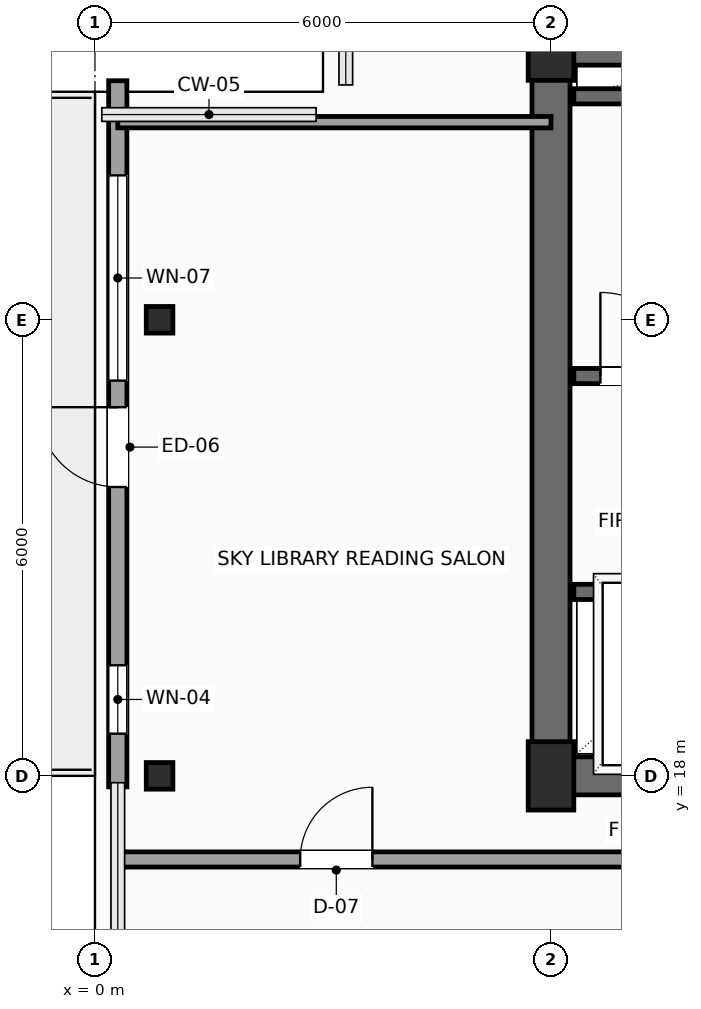
"""IFC4 building model, lengths in metres.
Left out: names, types, materials, properties, quantities, classifications, styles, units other than length and angle.
Written with IfcOpenShell. Run it as: python <this file> out.ifc"""

import sys

from ifc_helpers import new_model, si_unit, direction, frame, frame_2d, origin, origin_2d, place, context, subcontext, project, spatial, rectangle, hollow_rectangle, extrude, element, fill, save


model = new_model("IFC4")
c1 = context("Model", 3, precision=1e-05, world=origin(), true_north=direction((0.0, 1.0)))
c2 = subcontext(c1, "Body", "Model", "MODEL_VIEW")
j1 = project(units=[si_unit("LENGTHUNIT", "METRE"), si_unit("PLANEANGLEUNIT", "RADIAN")], contexts=[c1])
p1 = place(None, origin())
s1 = spatial("IfcSite", under=j1, at=p1, CompositionType="ELEMENT")
p2 = place(p1, origin())
s2 = spatial("IfcBuilding", under=s1, at=p2, CompositionType="ELEMENT")
p3 = place(p2, frame((0.0, 0.0, 274.7)))
s3 = spatial("IfcBuildingStorey", under=s2, at=p3, CompositionType="ELEMENT", Elevation=274.7)
for number, where, z_axis, x_axis in (
    (1, (6.0, 18.0, 0.0), (0.0, 0.0, 1.0), (1.0, 0.0, 0.0)),
    (2, (6.0, 27.6, 0.0), (0.0, 0.0, 1.0), (1.0, 0.0, 0.0)),
):
    element("IfcColumn", number, at=place(p3, frame(where, z_axis=z_axis, x_axis=x_axis)), inside=s3, PredefinedType="COLUMN", context=c2, shape_type="SweptSolid", body=[
        extrude(rectangle(XDim=0.6, YDim=0.9, at=origin_2d()), origin(), (0.0, 0.0, 1.0), 3.5),
    ])
for number, where, z_axis, x_axis in (
    (3, (0.85, 18.0, 0.0), (0.0, 0.0, 1.0), (1.0, 0.0, 0.0)),
    (4, (0.85, 24.0, 0.0), (0.0, 0.0, 1.0), (1.0, 0.0, 0.0)),
):
    element("IfcColumn", number, at=place(p3, frame(where, z_axis=z_axis, x_axis=x_axis)), inside=s3, PredefinedType="COLUMN", context=c2, shape_type="SweptSolid", body=[
        extrude(hollow_rectangle(XDim=0.35, YDim=0.35, WallThickness=0.016, InnerFilletRadius=0.016, OuterFilletRadius=0.032, at=origin_2d()), origin(), (0.0, 0.0, 1.0), 3.5),
    ])
p4 = place(p3, frame((0.3, 17.855, 0.0), z_axis=(0.0, 0.0, 1.0), x_axis=(0.0, 1.0, 0.0)))
e5 = element("IfcWall", 5, at=p4, inside=s3, PredefinedType="SOLIDWALL", context=c2, shape_type="SweptSolid", body=[
    extrude(rectangle(XDim=9.29, YDim=0.24, at=frame_2d((4.645, 0.0))), origin(), (0.0, 0.0, 1.0), 3.3),
])
p5 = place(p4, frame((3.945, 0.0, 0.0)))
e6 = element("IfcOpeningElement", 6, at=p5, cuts=e5, PredefinedType="OPENING", context=c2, shape_type="SweptSolid", body=[
    extrude(rectangle(XDim=1.05, YDim=2.2, at=frame_2d((0.525, 1.1))), frame((0.0, 0.13, 0.0), z_axis=(0.0, -1.0, 0.0), x_axis=(1.0, 0.0, 0.0)), (0.0, 0.0, 1.0), 0.26),
])
p6 = place(p4, frame((5.345, 0.0, 0.6)))
e7 = element("IfcOpeningElement", 7, at=p6, cuts=e5, PredefinedType="OPENING", context=c2, shape_type="SweptSolid", body=[
    extrude(rectangle(XDim=2.7, YDim=2.3, at=frame_2d((1.35, 1.15))), frame((0.0, 0.13, 0.0), z_axis=(0.0, -1.0, 0.0), x_axis=(1.0, 0.0, 0.0)), (0.0, 0.0, 1.0), 0.26),
])
p7 = place(p4, frame((0.7, 0.0, 0.6)))
e8 = element("IfcOpeningElement", 8, at=p7, cuts=e5, PredefinedType="OPENING", context=c2, shape_type="SweptSolid", body=[
    extrude(rectangle(XDim=0.9, YDim=2.2, at=frame_2d((0.45, 1.1))), frame((0.0, 0.13, 0.0), z_axis=(0.0, -1.0, 0.0), x_axis=(1.0, 0.0, 0.0)), (0.0, 0.0, 1.0), 0.26),
])
p8 = place(p3, frame((6.0, 18.0, 0.0), z_axis=(0.0, 0.0, 1.0), x_axis=(1.0, 0.0, 0.0)))
e9 = element("IfcWall", 9, at=p8, inside=s3, PredefinedType="SHEAR", context=c2, shape_type="SweptSolid", body=[
    extrude(rectangle(XDim=12.0, YDim=0.5, at=frame_2d((6.0, 0.0))), origin(), (0.0, 0.0, 1.0), 3.3),
])
p9 = place(p8, frame((7.1, 0.0, 0.0)))
e10 = element("IfcOpeningElement", 10, at=p9, cuts=e9, PredefinedType="OPENING", context=c2, shape_type="SweptSolid", body=[
    extrude(rectangle(XDim=1.6, YDim=2.3, at=frame_2d((0.8, 1.15))), frame((0.0, 0.26, 0.0), z_axis=(0.0, -1.0, 0.0), x_axis=(1.0, 0.0, 0.0)), (0.0, 0.0, 1.0), 0.52),
])
p10 = place(p3, frame((6.0, 27.6, 0.0), z_axis=(0.0, 0.0, 1.0), x_axis=(1.0, 0.0, 0.0)))
e11 = element("IfcWall", 11, at=p10, inside=s3, PredefinedType="SHEAR", context=c2, shape_type="SweptSolid", body=[
    extrude(rectangle(XDim=12.0, YDim=0.5, at=frame_2d((6.0, 0.0))), origin(), (0.0, 0.0, 1.0), 3.3),
])
p11 = place(p10, frame((10.3, 0.0, 0.0)))
e12 = element("IfcOpeningElement", 12, at=p11, cuts=e11, PredefinedType="OPENING", context=c2, shape_type="SweptSolid", body=[
    extrude(rectangle(XDim=0.9, YDim=2.15, at=frame_2d((0.45, 1.075))), frame((0.0, 0.26, 0.0), z_axis=(0.0, -1.0, 0.0), x_axis=(1.0, 0.0, 0.0)), (0.0, 0.0, 1.0), 0.52),
])
p12 = place(p3, frame((6.0, 18.0, 0.0), z_axis=(0.0, 0.0, 1.0), x_axis=(0.0, 1.0, 0.0)))
e13 = element("IfcWall", 13, at=p12, inside=s3, PredefinedType="SHEAR", context=c2, shape_type="SweptSolid", body=[
    extrude(rectangle(XDim=9.6, YDim=0.5, at=frame_2d((4.8, 0.0))), origin(), (0.0, 0.0, 1.0), 3.3),
])
p13 = place(p3, frame((6.3, 23.26, 0.0), z_axis=(0.0, 0.0, 1.0), x_axis=(1.0, 0.0, 0.0)))
e14 = element("IfcWall", 14, at=p13, inside=s3, PredefinedType="SHEAR", context=c2, shape_type="SweptSolid", body=[
    extrude(rectangle(XDim=8.88, YDim=0.2, at=frame_2d((4.44, 0.0))), origin(), (0.0, 0.0, 1.0), 3.3),
])
p14 = place(p13, frame((0.35, 0.0, 0.0)))
e15 = element("IfcOpeningElement", 15, at=p14, cuts=e14, PredefinedType="OPENING", context=c2, shape_type="SweptSolid", body=[
    extrude(rectangle(XDim=1.1, YDim=2.2, at=frame_2d((0.55, 1.1))), frame((0.0, 0.11, 0.0), z_axis=(0.0, -1.0, 0.0), x_axis=(1.0, 0.0, 0.0)), (0.0, 0.0, 1.0), 0.22),
])
p15 = place(p3, frame((6.3, 26.94, 0.0), z_axis=(0.0, 0.0, 1.0), x_axis=(1.0, 0.0, 0.0)))
e16 = element("IfcWall", 16, at=p15, inside=s3, PredefinedType="SHEAR", context=c2, shape_type="SweptSolid", body=[
    extrude(rectangle(XDim=8.88, YDim=0.2, at=frame_2d((4.44, 0.0))), origin(), (0.0, 0.0, 1.0), 3.3),
])
p16 = place(p3, frame((6.3, 20.42, 0.0), z_axis=(0.0, 0.0, 1.0), x_axis=(1.0, 0.0, 0.0)))
e17 = element("IfcWall", 17, at=p16, inside=s3, PredefinedType="SHEAR", context=c2, shape_type="SweptSolid", body=[
    extrude(rectangle(XDim=4.95, YDim=0.2, at=frame_2d((2.475, 0.0))), origin(), (0.0, 0.0, 1.0), 3.3),
])
p17 = place(p16, frame((0.65, 0.0, 0.0)))
e18 = element("IfcOpeningElement", 18, at=p17, cuts=e17, PredefinedType="OPENING", context=c2, shape_type="SweptSolid", body=[
    extrude(rectangle(XDim=1.1, YDim=2.2, at=frame_2d((0.55, 1.1))), frame((0.0, 0.11, 0.0), z_axis=(0.0, -1.0, 0.0), x_axis=(1.0, 0.0, 0.0)), (0.0, 0.0, 1.0), 0.22),
])
p18 = place(p16, frame((3.05, 0.0, 0.0)))
e19 = element("IfcOpeningElement", 19, at=p18, cuts=e17, PredefinedType="OPENING", context=c2, shape_type="SweptSolid", body=[
    extrude(rectangle(XDim=1.1, YDim=2.2, at=frame_2d((0.55, 1.1))), frame((0.0, 0.11, 0.0), z_axis=(0.0, -1.0, 0.0), x_axis=(1.0, 0.0, 0.0)), (0.0, 0.0, 1.0), 0.22),
])
p19 = place(p3, frame((0.3, 16.9, 0.0), z_axis=(0.0, 0.0, 1.0), x_axis=(1.0, 0.0, 0.0)))
e20 = element("IfcWall", 20, at=p19, inside=s3, PredefinedType="PARTITIONING", context=c2, shape_type="SweptSolid", body=[
    extrude(rectangle(XDim=12.3, YDim=0.2, at=frame_2d((6.15, 0.0))), origin(), (0.0, 0.0, 1.0), 3.3),
])
p20 = place(p19, frame((2.4, 0.0, 0.0)))
e21 = element("IfcOpeningElement", 21, at=p20, cuts=e20, PredefinedType="OPENING", context=c2, shape_type="SweptSolid", body=[
    extrude(rectangle(XDim=0.95, YDim=2.15, at=frame_2d((0.475, 1.075))), frame((0.0, 0.11, 0.0), z_axis=(0.0, -1.0, 0.0), x_axis=(1.0, 0.0, 0.0)), (0.0, 0.0, 1.0), 0.22),
])
p21 = place(p3, frame((0.3, 26.6, 0.0), z_axis=(0.0, 0.0, 1.0), x_axis=(1.0, 0.0, 0.0)))
e22 = element("IfcWall", 22, at=p21, inside=s3, PredefinedType="PARTITIONING", context=c2, shape_type="SweptSolid", body=[
    extrude(rectangle(XDim=5.7, YDim=0.15, at=frame_2d((2.85, 0.0))), origin(), (0.0, 0.0, 1.0), 3.3),
])
p22 = place(p5, origin())
e23 = element("IfcDoor", 23, at=p22, inside=s3, OperationType="SINGLE_SWING_RIGHT", PredefinedType="DOOR", context=c2, shape_type="SweptSolid", body=[
    extrude(rectangle(XDim=1.05, YDim=2.2, at=frame_2d((0.525, 1.1))), frame((0.0, 0.025, 0.0), z_axis=(0.0, -1.0, 0.0), x_axis=(1.0, 0.0, 0.0)), (0.0, 0.0, 1.0), 0.05),
])
fill(e6, e23)
p23 = place(p6, origin())
e24 = element("IfcWindow", 24, at=p23, inside=s3, PartitioningType="SINGLE_PANEL", PredefinedType="WINDOW", context=c2, shape_type="SweptSolid", body=[
    extrude(rectangle(XDim=2.7, YDim=2.3, at=frame_2d((1.35, 1.15))), frame((0.0, 0.03, 0.0), z_axis=(0.0, -1.0, 0.0), x_axis=(1.0, 0.0, 0.0)), (0.0, 0.0, 1.0), 0.06),
])
fill(e7, e24)
p24 = place(p7, origin())
e25 = element("IfcWindow", 25, at=p24, inside=s3, PartitioningType="SINGLE_PANEL", PredefinedType="WINDOW", context=c2, shape_type="SweptSolid", body=[
    extrude(rectangle(XDim=0.9, YDim=2.2, at=frame_2d((0.45, 1.1))), frame((0.0, 0.03, 0.0), z_axis=(0.0, -1.0, 0.0), x_axis=(1.0, 0.0, 0.0)), (0.0, 0.0, 1.0), 0.06),
])
fill(e8, e25)
p25 = place(p14, origin())
e26 = element("IfcDoor", 26, at=p25, inside=s3, OperationType="SINGLE_SWING_LEFT", PredefinedType="DOOR", context=c2, shape_type="SweptSolid", body=[
    extrude(rectangle(XDim=1.1, YDim=2.2, at=frame_2d((0.55, 1.1))), frame((0.0, 0.025, 0.0), z_axis=(0.0, -1.0, 0.0), x_axis=(1.0, 0.0, 0.0)), (0.0, 0.0, 1.0), 0.05),
])
fill(e15, e26)
p26 = place(p20, origin())
e27 = element("IfcDoor", 27, at=p26, inside=s3, OperationType="SINGLE_SWING_RIGHT", PredefinedType="DOOR", context=c2, shape_type="SweptSolid", body=[
    extrude(rectangle(XDim=0.95, YDim=2.15, at=frame_2d((0.475, 1.075))), frame((0.0, 0.025, 0.0), z_axis=(0.0, -1.0, 0.0), x_axis=(1.0, 0.0, 0.0)), (0.0, 0.0, 1.0), 0.05),
])
fill(e21, e27)
save(model, sys.argv[1])
